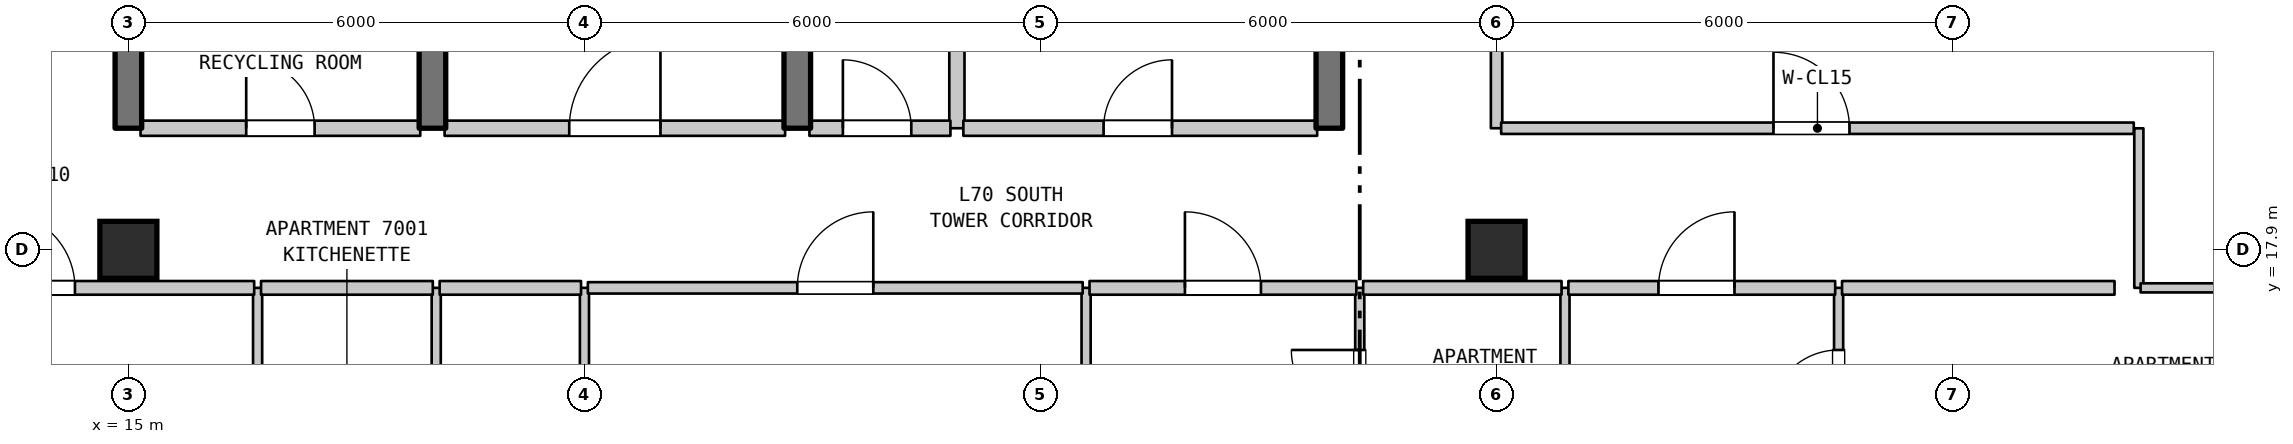
"""IFC4 building model, lengths in metres.
Left out: names, types, materials, properties, quantities, classifications, styles, units other than length and angle.
Written with IfcOpenShell. Run it as: python <this file> out.ifc"""

import sys

from ifc_helpers import new_model, si_unit, direction, frame, frame_2d, origin, origin_2d, place, context, subcontext, project, spatial, rectangle, extrude, element, fill, save


model = new_model("IFC4")
c1 = context("Model", 3, precision=1e-05, world=origin(), true_north=direction((0.0, 1.0)))
c2 = subcontext(c1, "Body", "Model", "MODEL_VIEW")
j1 = project(units=[si_unit("LENGTHUNIT", "METRE"), si_unit("PLANEANGLEUNIT", "RADIAN")], contexts=[c1])
p1 = place(None, origin())
s1 = spatial("IfcSite", under=j1, at=p1, CompositionType="ELEMENT")
p2 = place(p1, origin())
s2 = spatial("IfcBuilding", under=s1, at=p2, CompositionType="ELEMENT")
p3 = place(p2, frame((0.0, 0.0, 280.6)))
s3 = spatial("IfcBuildingStorey", under=s2, at=p3, CompositionType="ELEMENT", Elevation=280.6)
for number, where, z_axis, x_axis in (
    (1, (15.0, 17.9, 0.0), (0.0, 0.0, 1.0), (1.0, 0.0, 0.0)),
    (2, (33.0, 17.9, 0.0), (0.0, 0.0, 1.0), (1.0, 0.0, 0.0)),
):
    element("IfcColumn", number, at=place(p3, frame(where, z_axis=z_axis, x_axis=x_axis)), inside=s3, PredefinedType="COLUMN", context=c2, shape_type="SweptSolid", body=[
        extrude(rectangle(XDim=0.75, YDim=0.75, at=origin_2d()), origin(), (0.0, 0.0, 1.0), 3.7),
    ])
p4 = place(p3, frame((15.0, 19.5, 0.0), z_axis=(0.0, 0.0, 1.0), x_axis=(0.0, 1.0, 0.0)))
e3 = element("IfcWall", 3, at=p4, inside=s3, PredefinedType="SHEAR", context=c2, shape_type="SweptSolid", body=[
    extrude(rectangle(XDim=3.2, YDim=0.35, at=frame_2d((1.6, 0.0))), origin(), (0.0, 0.0, 1.0), 3.39),
])
p5 = place(p3, frame((16.7, 14.2, 0.0), z_axis=(0.0, 0.0, 1.0), x_axis=(0.0, 1.0, 0.0)))
e4 = element("IfcWall", 4, at=p5, inside=s3, PredefinedType="PARTITIONING", context=c2, shape_type="SweptSolid", body=[
    extrude(rectangle(XDim=3.2, YDim=0.12, at=frame_2d((1.6, 0.0))), origin(), (0.0, 0.0, 1.0), 3.39),
])
p6 = place(p5, frame((1.15, 0.0, 0.0)))
e5 = element("IfcOpeningElement", 5, at=p6, cuts=e4, PredefinedType="OPENING", context=c2, shape_type="SweptSolid", body=[
    extrude(rectangle(XDim=0.9, YDim=2.15, at=frame_2d((0.45, 1.075))), frame((0.0, 0.07, 0.0), z_axis=(0.0, -1.0, 0.0), x_axis=(1.0, 0.0, 0.0)), (0.0, 0.0, 1.0), 0.14),
])
p7 = place(p3, frame((19.0, 19.5, 0.0), z_axis=(0.0, 0.0, 1.0), x_axis=(0.0, 1.0, 0.0)))
e6 = element("IfcWall", 6, at=p7, inside=s3, PredefinedType="SHEAR", context=c2, shape_type="SweptSolid", body=[
    extrude(rectangle(XDim=3.2, YDim=0.35, at=frame_2d((1.6, 0.0))), origin(), (0.0, 0.0, 1.0), 3.39),
])
p8 = place(p3, frame((19.05, 14.2, 0.0), z_axis=(0.0, 0.0, 1.0), x_axis=(0.0, 1.0, 0.0)))
e7 = element("IfcWall", 7, at=p8, inside=s3, PredefinedType="PARTITIONING", context=c2, shape_type="SweptSolid", body=[
    extrude(rectangle(XDim=3.2, YDim=0.12, at=frame_2d((1.6, 0.0))), origin(), (0.0, 0.0, 1.0), 3.39),
])
p9 = place(p3, frame((21.0, 6.999, 0.0), z_axis=(0.0, 0.0, 1.0), x_axis=(0.0, 1.0, 0.0)))
e8 = element("IfcWall", 8, at=p9, inside=s3, PredefinedType="PARTITIONING", context=c2, shape_type="SweptSolid", body=[
    extrude(rectangle(XDim=10.401, YDim=0.12, at=frame_2d((5.2, 0.0))), origin(), (0.0, 0.0, 1.0), 3.39),
])
p10 = place(p3, frame((23.8, 19.5, 0.0), z_axis=(0.0, 0.0, 1.0), x_axis=(0.0, 1.0, 0.0)))
e9 = element("IfcWall", 9, at=p10, inside=s3, PredefinedType="SHEAR", context=c2, shape_type="SweptSolid", body=[
    extrude(rectangle(XDim=6.6, YDim=0.35, at=frame_2d((3.3, 0.0))), origin(), (0.0, 0.0, 1.0), 3.39),
])
p11 = place(p10, frame((4.304, 0.0, 0.0)))
e10 = element("IfcOpeningElement", 10, at=p11, cuts=e9, PredefinedType="OPENING", context=c2, shape_type="SweptSolid", body=[
    extrude(rectangle(XDim=0.9, YDim=2.15, at=frame_2d((0.45, 1.075))), frame((0.0, 0.185, 0.0), z_axis=(0.0, -1.0, 0.0), x_axis=(1.0, 0.0, 0.0)), (0.0, 0.0, 1.0), 0.37),
])
p12 = place(p3, frame((25.9, 19.5, 0.0), z_axis=(0.0, 0.0, 1.0), x_axis=(0.0, 1.0, 0.0)))
e11 = element("IfcWall", 11, at=p12, inside=s3, PredefinedType="STANDARD", context=c2, shape_type="SweptSolid", body=[
    extrude(rectangle(XDim=3.2, YDim=0.2, at=frame_2d((1.6, 0.0))), origin(), (0.0, 0.0, 1.0), 3.39),
])
p13 = place(p3, frame((27.6, 6.71, 0.0), z_axis=(0.0, 0.0, 1.0), x_axis=(0.0, 1.0, 0.0)))
e12 = element("IfcWall", 12, at=p13, inside=s3, PredefinedType="PARTITIONING", context=c2, shape_type="SweptSolid", body=[
    extrude(rectangle(XDim=10.69, YDim=0.12, at=frame_2d((5.345, 0.0))), origin(), (0.0, 0.0, 1.0), 3.39),
])
p14 = place(p3, frame((30.8, 19.5, 0.0), z_axis=(0.0, 0.0, 1.0), x_axis=(0.0, 1.0, 0.0)))
e13 = element("IfcWall", 13, at=p14, inside=s3, PredefinedType="SHEAR", context=c2, shape_type="SweptSolid", body=[
    extrude(rectangle(XDim=3.2, YDim=0.35, at=frame_2d((1.6, 0.0))), origin(), (0.0, 0.0, 1.0), 3.39),
])
p15 = place(p3, frame((31.2, 15.008, 0.0), z_axis=(0.0, 0.0, 1.0), x_axis=(0.0, 1.0, 0.0)))
e14 = element("IfcWall", 14, at=p15, inside=s3, PredefinedType="PARTITIONING", context=c2, shape_type="SweptSolid", body=[
    extrude(rectangle(XDim=2.392, YDim=0.12, at=frame_2d((1.196, 0.0))), origin(), (0.0, 0.0, 1.0), 3.39),
])
p16 = place(p15, frame((0.675, 0.0, 0.0)))
e15 = element("IfcOpeningElement", 15, at=p16, cuts=e14, PredefinedType="OPENING", context=c2, shape_type="SweptSolid", body=[
    extrude(rectangle(XDim=0.9, YDim=2.1, at=frame_2d((0.45, 1.05))), frame((0.0, 0.07, 0.0), z_axis=(0.0, -1.0, 0.0), x_axis=(1.0, 0.0, 0.0)), (0.0, 0.0, 1.0), 0.14),
])
p17 = place(p3, frame((33.0, 19.5, 0.0), z_axis=(0.0, 0.0, 1.0), x_axis=(0.0, 1.0, 0.0)))
e16 = element("IfcWall", 16, at=p17, inside=s3, PredefinedType="STANDARD", context=c2, shape_type="SweptSolid", body=[
    extrude(rectangle(XDim=7.7, YDim=0.15, at=frame_2d((3.85, 0.0))), origin(), (0.0, 0.0, 1.0), 3.1),
])
p18 = place(p17, frame((3.913, 0.0, 0.0)))
e17 = element("IfcOpeningElement", 17, at=p18, cuts=e16, PredefinedType="OPENING", context=c2, shape_type="SweptSolid", body=[
    extrude(rectangle(XDim=1.0, YDim=2.15, at=frame_2d((0.5, 1.075))), frame((0.0, 0.085, 0.0), z_axis=(0.0, -1.0, 0.0), x_axis=(1.0, 0.0, 0.0)), (0.0, 0.0, 1.0), 0.17),
])
p19 = place(p3, frame((33.9, 15.008, 0.0), z_axis=(0.0, 0.0, 1.0), x_axis=(0.0, 1.0, 0.0)))
e18 = element("IfcWall", 18, at=p19, inside=s3, PredefinedType="PARTITIONING", context=c2, shape_type="SweptSolid", body=[
    extrude(rectangle(XDim=2.392, YDim=0.12, at=frame_2d((1.196, 0.0))), origin(), (0.0, 0.0, 1.0), 3.39),
])
p20 = place(p3, frame((37.5, 15.008, 0.0), z_axis=(0.0, 0.0, 1.0), x_axis=(0.0, 1.0, 0.0)))
e19 = element("IfcWall", 19, at=p20, inside=s3, PredefinedType="PARTITIONING", context=c2, shape_type="SweptSolid", body=[
    extrude(rectangle(XDim=2.392, YDim=0.12, at=frame_2d((1.196, 0.0))), origin(), (0.0, 0.0, 1.0), 3.39),
])
p21 = place(p20, frame((0.675, 0.0, 0.0)))
e20 = element("IfcOpeningElement", 20, at=p21, cuts=e19, PredefinedType="OPENING", context=c2, shape_type="SweptSolid", body=[
    extrude(rectangle(XDim=0.9, YDim=2.1, at=frame_2d((0.45, 1.05))), frame((0.0, 0.07, 0.0), z_axis=(0.0, -1.0, 0.0), x_axis=(1.0, 0.0, 0.0)), (0.0, 0.0, 1.0), 0.14),
])
p22 = place(p3, frame((41.45, 17.4, 0.0), z_axis=(0.0, 0.0, 1.0), x_axis=(0.0, 1.0, 0.0)))
e21 = element("IfcWall", 21, at=p22, inside=s3, PredefinedType="PARTITIONING", context=c2, shape_type="SweptSolid", body=[
    extrude(rectangle(XDim=2.099, YDim=0.12, at=frame_2d((1.05, 0.0))), origin(), (0.0, 0.0, 1.0), 3.39),
])
p23 = place(p3, frame((12.975, 17.4, 0.0), z_axis=(0.0, 0.0, 1.0), x_axis=(1.0, 0.0, 0.0)))
e22 = element("IfcWall", 22, at=p23, inside=s3, PredefinedType="STANDARD", context=c2, shape_type="SweptSolid", body=[
    extrude(rectangle(XDim=3.68, YDim=0.18, at=frame_2d((1.84, 0.0))), origin(), (0.0, 0.0, 1.0), 3.39),
])
p24 = place(p23, frame((0.322, 0.0, 0.0)))
e23 = element("IfcOpeningElement", 23, at=p24, cuts=e22, PredefinedType="OPENING", context=c2, shape_type="SweptSolid", body=[
    extrude(rectangle(XDim=1.0, YDim=2.15, at=frame_2d((0.5, 1.075))), frame((0.0, 0.1, 0.0), z_axis=(0.0, -1.0, 0.0), x_axis=(1.0, 0.0, 0.0)), (0.0, 0.0, 1.0), 0.2),
])
p25 = place(p3, frame((16.745, 17.4, 0.0), z_axis=(0.0, 0.0, 1.0), x_axis=(1.0, 0.0, 0.0)))
e24 = element("IfcWall", 24, at=p25, inside=s3, PredefinedType="STANDARD", context=c2, shape_type="SweptSolid", body=[
    extrude(rectangle(XDim=2.26, YDim=0.18, at=frame_2d((1.13, 0.0))), origin(), (0.0, 0.0, 1.0), 3.39),
])
p26 = place(p3, frame((19.095, 17.4, 0.0), z_axis=(0.0, 0.0, 1.0), x_axis=(1.0, 0.0, 0.0)))
e25 = element("IfcWall", 25, at=p26, inside=s3, PredefinedType="STANDARD", context=c2, shape_type="SweptSolid", body=[
    extrude(rectangle(XDim=1.86, YDim=0.18, at=frame_2d((0.93, 0.0))), origin(), (0.0, 0.0, 1.0), 3.39),
])
p27 = place(p3, frame((21.045, 17.4, 0.0), z_axis=(0.0, 0.0, 1.0), x_axis=(1.0, 0.0, 0.0)))
e26 = element("IfcWall", 26, at=p27, inside=s3, PredefinedType="STANDARD", context=c2, shape_type="SweptSolid", body=[
    extrude(rectangle(XDim=6.51, YDim=0.15, at=frame_2d((3.255, 0.0))), origin(), (0.0, 0.0, 1.0), 3.39),
])
p28 = place(p27, frame((2.755, 0.0, 0.0)))
e27 = element("IfcOpeningElement", 27, at=p28, cuts=e26, PredefinedType="OPENING", context=c2, shape_type="SweptSolid", body=[
    extrude(rectangle(XDim=1.0, YDim=2.15, at=frame_2d((0.5, 1.075))), frame((0.0, 0.085, 0.0), z_axis=(0.0, -1.0, 0.0), x_axis=(1.0, 0.0, 0.0)), (0.0, 0.0, 1.0), 0.17),
])
p29 = place(p3, frame((27.645, 17.4, 0.0), z_axis=(0.0, 0.0, 1.0), x_axis=(1.0, 0.0, 0.0)))
e28 = element("IfcWall", 28, at=p29, inside=s3, PredefinedType="STANDARD", context=c2, shape_type="SweptSolid", body=[
    extrude(rectangle(XDim=3.51, YDim=0.18, at=frame_2d((1.755, 0.0))), origin(), (0.0, 0.0, 1.0), 3.39),
])
p30 = place(p29, frame((1.255, 0.0, 0.0)))
e29 = element("IfcOpeningElement", 29, at=p30, cuts=e28, PredefinedType="OPENING", context=c2, shape_type="SweptSolid", body=[
    extrude(rectangle(XDim=1.0, YDim=2.15, at=frame_2d((0.5, 1.075))), frame((0.0, 0.1, 0.0), z_axis=(0.0, -1.0, 0.0), x_axis=(1.0, 0.0, 0.0)), (0.0, 0.0, 1.0), 0.2),
])
p31 = place(p3, frame((31.245, 17.4, 0.0), z_axis=(0.0, 0.0, 1.0), x_axis=(1.0, 0.0, 0.0)))
e30 = element("IfcWall", 30, at=p31, inside=s3, PredefinedType="STANDARD", context=c2, shape_type="SweptSolid", body=[
    extrude(rectangle(XDim=2.61, YDim=0.18, at=frame_2d((1.305, 0.0))), origin(), (0.0, 0.0, 1.0), 3.39),
])
p32 = place(p3, frame((33.945, 17.4, 0.0), z_axis=(0.0, 0.0, 1.0), x_axis=(1.0, 0.0, 0.0)))
e31 = element("IfcWall", 31, at=p32, inside=s3, PredefinedType="STANDARD", context=c2, shape_type="SweptSolid", body=[
    extrude(rectangle(XDim=3.51, YDim=0.18, at=frame_2d((1.755, 0.0))), origin(), (0.0, 0.0, 1.0), 3.39),
])
p33 = place(p32, frame((1.185, 0.0, 0.0)))
e32 = element("IfcOpeningElement", 32, at=p33, cuts=e31, PredefinedType="OPENING", context=c2, shape_type="SweptSolid", body=[
    extrude(rectangle(XDim=1.0, YDim=2.15, at=frame_2d((0.5, 1.075))), frame((0.0, 0.1, 0.0), z_axis=(0.0, -1.0, 0.0), x_axis=(1.0, 0.0, 0.0)), (0.0, 0.0, 1.0), 0.2),
])
p34 = place(p3, frame((37.545, 17.4, 0.0), z_axis=(0.0, 0.0, 1.0), x_axis=(1.0, 0.0, 0.0)))
e33 = element("IfcWall", 33, at=p34, inside=s3, PredefinedType="STANDARD", context=c2, shape_type="SweptSolid", body=[
    extrude(rectangle(XDim=3.585, YDim=0.18, at=frame_2d((1.792, 0.0))), origin(), (0.0, 0.0, 1.0), 3.39),
])
p35 = place(p3, frame((41.473, 17.4, 0.0), z_axis=(0.0, 0.0, 1.0), x_axis=(1.0, 0.0, 0.0)))
e34 = element("IfcWall", 34, at=p35, inside=s3, PredefinedType="PARTITIONING", context=c2, shape_type="SweptSolid", body=[
    extrude(rectangle(XDim=2.031, YDim=0.12, at=frame_2d((1.016, 0.0))), origin(), (0.0, 0.0, 1.0), 3.39),
])
p36 = place(p3, frame((15.16, 19.5, 0.0), z_axis=(0.0, 0.0, 1.0), x_axis=(1.0, 0.0, 0.0)))
e35 = element("IfcWall", 35, at=p36, inside=s3, PredefinedType="STANDARD", context=c2, shape_type="SweptSolid", body=[
    extrude(rectangle(XDim=3.68, YDim=0.2, at=frame_2d((1.84, 0.0))), origin(), (0.0, 0.0, 1.0), 3.39),
])
p37 = place(p36, frame((1.39, 0.0, 0.0)))
e36 = element("IfcOpeningElement", 36, at=p37, cuts=e35, PredefinedType="OPENING", context=c2, shape_type="SweptSolid", body=[
    extrude(rectangle(XDim=0.9, YDim=2.15, at=frame_2d((0.45, 1.075))), frame((0.0, 0.11, 0.0), z_axis=(0.0, -1.0, 0.0), x_axis=(1.0, 0.0, 0.0)), (0.0, 0.0, 1.0), 0.22),
])
p38 = place(p3, frame((19.16, 19.5, 0.0), z_axis=(0.0, 0.0, 1.0), x_axis=(1.0, 0.0, 0.0)))
e37 = element("IfcWall", 37, at=p38, inside=s3, PredefinedType="STANDARD", context=c2, shape_type="SweptSolid", body=[
    extrude(rectangle(XDim=4.48, YDim=0.2, at=frame_2d((2.24, 0.0))), origin(), (0.0, 0.0, 1.0), 3.39),
])
p39 = place(p38, frame((1.64, 0.0, 0.0)))
e38 = element("IfcOpeningElement", 38, at=p39, cuts=e37, PredefinedType="OPENING", context=c2, shape_type="SweptSolid", body=[
    extrude(rectangle(XDim=1.2, YDim=2.2, at=frame_2d((0.6, 1.1))), frame((0.0, 0.11, 0.0), z_axis=(0.0, -1.0, 0.0), x_axis=(1.0, 0.0, 0.0)), (0.0, 0.0, 1.0), 0.22),
])
p40 = place(p3, frame((23.96, 19.5, 0.0), z_axis=(0.0, 0.0, 1.0), x_axis=(1.0, 0.0, 0.0)))
e39 = element("IfcWall", 39, at=p40, inside=s3, PredefinedType="STANDARD", context=c2, shape_type="SweptSolid", body=[
    extrude(rectangle(XDim=1.855, YDim=0.2, at=frame_2d((0.927, 0.0))), origin(), (0.0, 0.0, 1.0), 3.39),
])
p41 = place(p40, frame((0.44, 0.0, 0.0)))
e40 = element("IfcOpeningElement", 40, at=p41, cuts=e39, PredefinedType="OPENING", context=c2, shape_type="SweptSolid", body=[
    extrude(rectangle(XDim=0.9, YDim=2.15, at=frame_2d((0.45, 1.075))), frame((0.0, 0.11, 0.0), z_axis=(0.0, -1.0, 0.0), x_axis=(1.0, 0.0, 0.0)), (0.0, 0.0, 1.0), 0.22),
])
p42 = place(p3, frame((25.985, 19.5, 0.0), z_axis=(0.0, 0.0, 1.0), x_axis=(1.0, 0.0, 0.0)))
e41 = element("IfcWall", 41, at=p42, inside=s3, PredefinedType="STANDARD", context=c2, shape_type="SweptSolid", body=[
    extrude(rectangle(XDim=4.655, YDim=0.2, at=frame_2d((2.327, 0.0))), origin(), (0.0, 0.0, 1.0), 3.39),
])
p43 = place(p42, frame((1.845, 0.0, 0.0)))
e42 = element("IfcOpeningElement", 42, at=p43, cuts=e41, PredefinedType="OPENING", context=c2, shape_type="SweptSolid", body=[
    extrude(rectangle(XDim=0.9, YDim=2.15, at=frame_2d((0.45, 1.075))), frame((0.0, 0.11, 0.0), z_axis=(0.0, -1.0, 0.0), x_axis=(1.0, 0.0, 0.0)), (0.0, 0.0, 1.0), 0.22),
])
p44 = place(p3, frame((33.06, 19.5, 0.0), z_axis=(0.0, 0.0, 1.0), x_axis=(1.0, 0.0, 0.0)))
e43 = element("IfcWall", 43, at=p44, inside=s3, PredefinedType="STANDARD", context=c2, shape_type="SweptSolid", body=[
    extrude(rectangle(XDim=8.323, YDim=0.15, at=frame_2d((4.162, 0.0))), origin(), (0.0, 0.0, 1.0), 3.39),
])
p45 = place(p44, frame((3.583, 0.0, 0.0)))
e44 = element("IfcOpeningElement", 44, at=p45, cuts=e43, PredefinedType="OPENING", context=c2, shape_type="SweptSolid", body=[
    extrude(rectangle(XDim=1.0, YDim=2.15, at=frame_2d((0.5, 1.075))), frame((0.0, 0.085, 0.0), z_axis=(0.0, -1.0, 0.0), x_axis=(1.0, 0.0, 0.0)), (0.0, 0.0, 1.0), 0.17),
])
p46 = place(p16, origin())
e45 = element("IfcDoor", 45, at=p46, inside=s3, OperationType="SINGLE_SWING_RIGHT", PredefinedType="DOOR", context=c2, shape_type="SweptSolid", body=[
    extrude(rectangle(XDim=0.9, YDim=2.1, at=frame_2d((0.45, 1.05))), frame((0.0, 0.025, 0.0), z_axis=(0.0, -1.0, 0.0), x_axis=(1.0, 0.0, 0.0)), (0.0, 0.0, 1.0), 0.05),
])
fill(e15, e45)
p47 = place(p21, origin())
e46 = element("IfcDoor", 46, at=p47, inside=s3, OperationType="SINGLE_SWING_LEFT", PredefinedType="DOOR", context=c2, shape_type="SweptSolid", body=[
    extrude(rectangle(XDim=0.9, YDim=2.1, at=frame_2d((0.45, 1.05))), frame((0.0, 0.025, 0.0), z_axis=(0.0, -1.0, 0.0), x_axis=(1.0, 0.0, 0.0)), (0.0, 0.0, 1.0), 0.05),
])
fill(e20, e46)
p48 = place(p24, origin())
e47 = element("IfcDoor", 47, at=p48, inside=s3, OperationType="SINGLE_SWING_LEFT", PredefinedType="DOOR", context=c2, shape_type="SweptSolid", body=[
    extrude(rectangle(XDim=1.0, YDim=2.15, at=frame_2d((0.5, 1.075))), frame((0.0, 0.025, 0.0), z_axis=(0.0, -1.0, 0.0), x_axis=(1.0, 0.0, 0.0)), (0.0, 0.0, 1.0), 0.05),
])
fill(e23, e47)
p49 = place(p28, origin())
e48 = element("IfcDoor", 48, at=p49, inside=s3, OperationType="SINGLE_SWING_RIGHT", PredefinedType="DOOR", context=c2, shape_type="SweptSolid", body=[
    extrude(rectangle(XDim=1.0, YDim=2.15, at=frame_2d((0.5, 1.075))), frame((0.0, 0.025, 0.0), z_axis=(0.0, -1.0, 0.0), x_axis=(1.0, 0.0, 0.0)), (0.0, 0.0, 1.0), 0.05),
])
fill(e27, e48)
p50 = place(p30, origin())
e49 = element("IfcDoor", 49, at=p50, inside=s3, OperationType="SINGLE_SWING_LEFT", PredefinedType="DOOR", context=c2, shape_type="SweptSolid", body=[
    extrude(rectangle(XDim=1.0, YDim=2.15, at=frame_2d((0.5, 1.075))), frame((0.0, 0.025, 0.0), z_axis=(0.0, -1.0, 0.0), x_axis=(1.0, 0.0, 0.0)), (0.0, 0.0, 1.0), 0.05),
])
fill(e29, e49)
p51 = place(p33, origin())
e50 = element("IfcDoor", 50, at=p51, inside=s3, OperationType="SINGLE_SWING_RIGHT", PredefinedType="DOOR", context=c2, shape_type="SweptSolid", body=[
    extrude(rectangle(XDim=1.0, YDim=2.15, at=frame_2d((0.5, 1.075))), frame((0.0, 0.025, 0.0), z_axis=(0.0, -1.0, 0.0), x_axis=(1.0, 0.0, 0.0)), (0.0, 0.0, 1.0), 0.05),
])
fill(e32, e50)
p52 = place(p37, origin())
e51 = element("IfcDoor", 51, at=p52, inside=s3, OperationType="SINGLE_SWING_LEFT", PredefinedType="DOOR", context=c2, shape_type="SweptSolid", body=[
    extrude(rectangle(XDim=0.9, YDim=2.15, at=frame_2d((0.45, 1.075))), frame((0.0, 0.025, 0.0), z_axis=(0.0, -1.0, 0.0), x_axis=(1.0, 0.0, 0.0)), (0.0, 0.0, 1.0), 0.05),
])
fill(e36, e51)
p53 = place(p39, origin())
e52 = element("IfcDoor", 52, at=p53, inside=s3, OperationType="SINGLE_SWING_RIGHT", PredefinedType="DOOR", context=c2, shape_type="SweptSolid", body=[
    extrude(rectangle(XDim=1.2, YDim=2.2, at=frame_2d((0.6, 1.1))), frame((0.0, 0.025, 0.0), z_axis=(0.0, -1.0, 0.0), x_axis=(1.0, 0.0, 0.0)), (0.0, 0.0, 1.0), 0.05),
])
fill(e38, e52)
p54 = place(p41, origin())
e53 = element("IfcDoor", 53, at=p54, inside=s3, OperationType="SINGLE_SWING_LEFT", PredefinedType="DOOR", context=c2, shape_type="SweptSolid", body=[
    extrude(rectangle(XDim=0.9, YDim=2.15, at=frame_2d((0.45, 1.075))), frame((0.0, 0.025, 0.0), z_axis=(0.0, -1.0, 0.0), x_axis=(1.0, 0.0, 0.0)), (0.0, 0.0, 1.0), 0.05),
])
fill(e40, e53)
p55 = place(p43, origin())
e54 = element("IfcDoor", 54, at=p55, inside=s3, OperationType="SINGLE_SWING_RIGHT", PredefinedType="DOOR", context=c2, shape_type="SweptSolid", body=[
    extrude(rectangle(XDim=0.9, YDim=2.15, at=frame_2d((0.45, 1.075))), frame((0.0, 0.025, 0.0), z_axis=(0.0, -1.0, 0.0), x_axis=(1.0, 0.0, 0.0)), (0.0, 0.0, 1.0), 0.05),
])
fill(e42, e54)
p56 = place(p45, origin())
e55 = element("IfcDoor", 55, at=p56, inside=s3, OperationType="SINGLE_SWING_LEFT", PredefinedType="DOOR", context=c2, shape_type="SweptSolid", body=[
    extrude(rectangle(XDim=1.0, YDim=2.15, at=frame_2d((0.5, 1.075))), frame((0.0, 0.025, 0.0), z_axis=(0.0, -1.0, 0.0), x_axis=(1.0, 0.0, 0.0)), (0.0, 0.0, 1.0), 0.05),
])
fill(e44, e55)
save(model, sys.argv[1])
